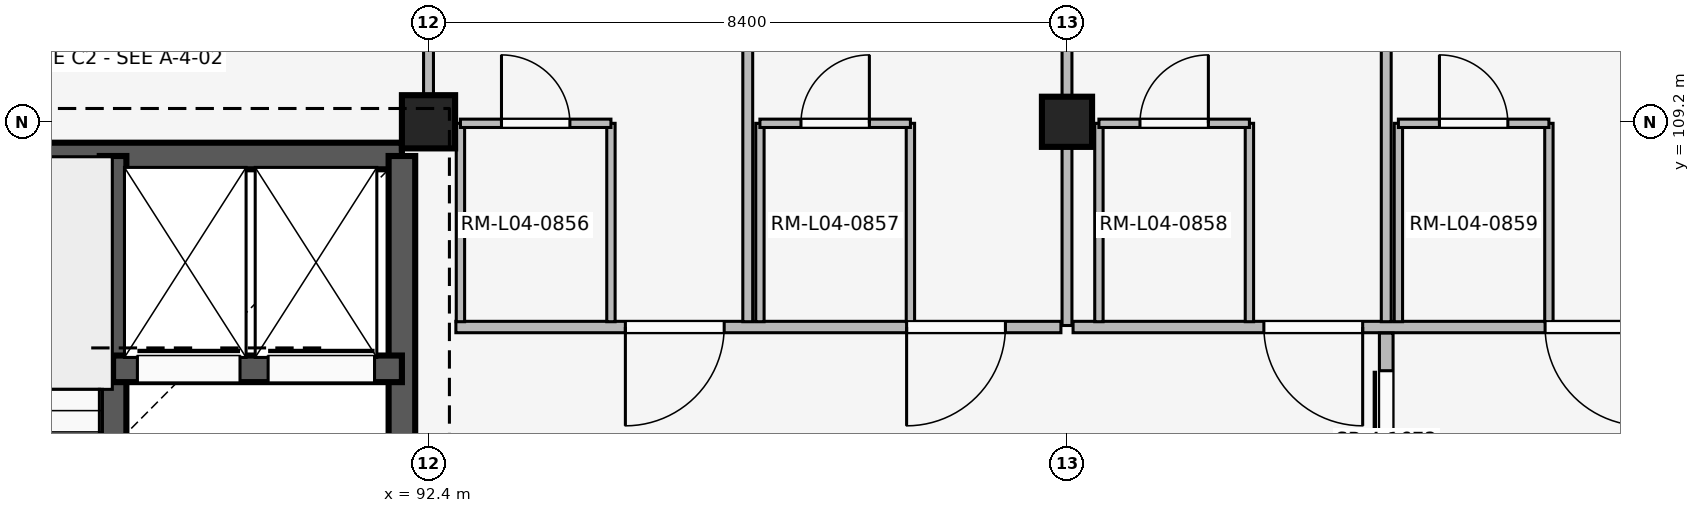
"""IFC4 building model, lengths in metres.
Left out: names, types, materials, properties, quantities, classifications, styles, units other than length and angle.
Written with IfcOpenShell. Run it as: python <this file> out.ifc"""

import sys

from ifc_helpers import new_model, si_unit, direction, frame, frame_2d, origin, origin_2d, place, context, subcontext, project, spatial, rectangle, extrude, element, fill, save


model = new_model("IFC4")
c1 = context("Model", 3, precision=1e-05, world=origin(), true_north=direction((0.0, 1.0)))
c2 = subcontext(c1, "Body", "Model", "MODEL_VIEW")
j1 = project(units=[si_unit("LENGTHUNIT", "METRE"), si_unit("PLANEANGLEUNIT", "RADIAN")], contexts=[c1])
p1 = place(None, origin())
s1 = spatial("IfcSite", under=j1, at=p1, CompositionType="ELEMENT")
p2 = place(p1, origin())
s2 = spatial("IfcBuilding", under=s1, at=p2, CompositionType="ELEMENT")
p3 = place(p2, frame((0.0, 0.0, 16.2)))
s3 = spatial("IfcBuildingStorey", under=s2, at=p3, CompositionType="ELEMENT", Elevation=16.2)
p4 = place(p3, frame((92.4, 109.2, 0.0), z_axis=(0.0, 0.0, 1.0), x_axis=(1.0, 0.0, 0.0)))
e1 = element("IfcColumn", 1, at=p4, inside=s3, PredefinedType="COLUMN", context=c2, shape_type="SweptSolid", body=[
    extrude(rectangle(XDim=0.7, YDim=0.7, at=origin_2d()), origin(), (0.0, 0.0, 1.0), 4.2),
])
p5 = place(p3, frame((100.8, 109.2, 0.0), z_axis=(0.0, 0.0, 1.0), x_axis=(1.0, 0.0, 0.0)))
e2 = element("IfcColumn", 2, at=p5, inside=s3, PredefinedType="COLUMN", context=c2, shape_type="SweptSolid", body=[
    extrude(rectangle(XDim=0.66, YDim=0.66, at=origin_2d()), origin(), (0.0, 0.0, 1.0), 4.2),
])
p6 = place(p3, frame((84.55, 108.75, 0.0), z_axis=(0.0, 0.0, 1.0), x_axis=(1.0, 0.0, 0.0)))
e3 = element("IfcWall", 3, at=p6, inside=s3, PredefinedType="SHEAR", context=c2, shape_type="SweptSolid", body=[
    extrude(rectangle(XDim=7.5, YDim=0.35, at=frame_2d((3.75, 0.0))), origin(), (0.0, 0.0, 1.0), 3.92),
])
p7 = place(p3, frame((92.05, 101.2, 0.0), z_axis=(0.0, 0.0, 1.0), x_axis=(0.0, 1.0, 0.0)))
e4 = element("IfcWall", 4, at=p7, inside=s3, PredefinedType="SHEAR", context=c2, shape_type="SweptSolid", body=[
    extrude(rectangle(XDim=7.55, YDim=0.35, at=frame_2d((3.775, 0.0))), origin(), (0.0, 0.0, 1.0), 3.92),
])
p8 = place(p7, frame((2.4, 0.0, 0.0)))
e5 = element("IfcOpeningElement", 5, at=p8, cuts=e4, PredefinedType="OPENING", context=c2, shape_type="SweptSolid", body=[
    extrude(rectangle(XDim=1.2, YDim=2.2, at=frame_2d((0.6, 1.1))), frame((0.0, 0.185, 0.0), z_axis=(0.0, -1.0, 0.0), x_axis=(1.0, 0.0, 0.0)), (0.0, 0.0, 1.0), 0.37),
])
p9 = place(p3, frame((88.25, 101.2, 0.0), z_axis=(0.0, 0.0, 1.0), x_axis=(0.0, 1.0, 0.0)))
e6 = element("IfcWall", 6, at=p9, inside=s3, PredefinedType="SHEAR", context=c2, shape_type="SweptSolid", body=[
    extrude(rectangle(XDim=7.55, YDim=0.35, at=frame_2d((3.775, 0.0))), origin(), (0.0, 0.0, 1.0), 3.92),
])
p10 = place(p9, frame((0.28, 0.0, 0.0)))
e7 = element("IfcOpeningElement", 7, at=p10, cuts=e6, PredefinedType="OPENING", context=c2, shape_type="SweptSolid", body=[
    extrude(rectangle(XDim=1.0, YDim=2.15, at=frame_2d((0.5, 1.075))), frame((0.0, 0.185, 0.0), z_axis=(0.0, -1.0, 0.0), x_axis=(1.0, 0.0, 0.0)), (0.0, 0.0, 1.0), 0.37),
])
p11 = place(p3, frame((88.25, 105.95, 0.0), z_axis=(0.0, 0.0, 1.0), x_axis=(1.0, 0.0, 0.0)))
e8 = element("IfcWall", 8, at=p11, inside=s3, PredefinedType="SHEAR", context=c2, shape_type="SweptSolid", body=[
    extrude(rectangle(XDim=3.8, YDim=0.35, at=frame_2d((1.9, 0.0))), origin(), (0.0, 0.0, 1.0), 3.92),
])
p12 = place(p11, frame((0.32, 0.0, 0.0)))
e9 = element("IfcOpeningElement", 9, at=p12, cuts=e8, PredefinedType="OPENING", context=c2, shape_type="SweptSolid", body=[
    extrude(rectangle(XDim=1.35, YDim=2.25, at=frame_2d((0.675, 1.125))), frame((0.0, 0.185, 0.0), z_axis=(0.0, -1.0, 0.0), x_axis=(1.0, 0.0, 0.0)), (0.0, 0.0, 1.0), 0.37),
])
p13 = place(p11, frame((2.04, 0.0, 0.0)))
e10 = element("IfcOpeningElement", 10, at=p13, cuts=e8, PredefinedType="OPENING", context=c2, shape_type="SweptSolid", body=[
    extrude(rectangle(XDim=1.4, YDim=2.25, at=frame_2d((0.7, 1.125))), frame((0.0, 0.185, 0.0), z_axis=(0.0, -1.0, 0.0), x_axis=(1.0, 0.0, 0.0)), (0.0, 0.0, 1.0), 0.37),
])
p14 = place(p3, frame((92.4, 109.55, 0.0), z_axis=(0.0, 0.0, 1.0), x_axis=(0.0, 1.0, 0.0)))
e11 = element("IfcWall", 11, at=p14, inside=s3, PredefinedType="PARTITIONING", context=c2, shape_type="SweptSolid", body=[
    extrude(rectangle(XDim=7.91, YDim=0.13, at=frame_2d((3.955, 0.0))), origin(), (0.0, 0.0, 1.0), 3.3),
])
p15 = place(p14, frame((3.4, 0.0, 0.0)))
e12 = element("IfcOpeningElement", 12, at=p15, cuts=e11, PredefinedType="OPENING", context=c2, shape_type="SweptSolid", body=[
    extrude(rectangle(XDim=1.05, YDim=2.2, at=frame_2d((0.525, 1.1))), frame((0.0, 0.075, 0.0), z_axis=(0.0, -1.0, 0.0), x_axis=(1.0, 0.0, 0.0)), (0.0, 0.0, 1.0), 0.15),
])
p16 = place(p3, frame((100.72, 106.5, 0.0), z_axis=(0.0, 0.0, 1.0), x_axis=(-1.0, 0.0, 0.0)))
e13 = element("IfcWall", 13, at=p16, inside=s3, PredefinedType="PARTITIONING", context=c2, shape_type="SweptSolid", body=[
    extrude(rectangle(XDim=7.96, YDim=0.15, at=frame_2d((3.98, 0.0))), origin(), (0.0, 0.0, 1.0), 3.3),
])
p17 = place(p16, frame((0.73, 0.0, 0.0)))
e14 = element("IfcOpeningElement", 14, at=p17, cuts=e13, PredefinedType="OPENING", context=c2, shape_type="SweptSolid", body=[
    extrude(rectangle(XDim=1.3, YDim=2.25, at=frame_2d((0.65, 1.125))), frame((0.0, 0.085, 0.0), z_axis=(0.0, -1.0, 0.0), x_axis=(1.0, 0.0, 0.0)), (0.0, 0.0, 1.0), 0.17),
])
p18 = place(p16, frame((4.43, 0.0, 0.0)))
e15 = element("IfcOpeningElement", 15, at=p18, cuts=e13, PredefinedType="OPENING", context=c2, shape_type="SweptSolid", body=[
    extrude(rectangle(XDim=1.3, YDim=2.25, at=frame_2d((0.65, 1.125))), frame((0.0, 0.085, 0.0), z_axis=(0.0, -1.0, 0.0), x_axis=(1.0, 0.0, 0.0)), (0.0, 0.0, 1.0), 0.17),
])
p19 = place(p3, frame((96.6, 106.57, 0.0), z_axis=(0.0, 0.0, 1.0), x_axis=(0.0, 1.0, 0.0)))
e16 = element("IfcWall", 16, at=p19, inside=s3, PredefinedType="PARTITIONING", context=c2, shape_type="SweptSolid", body=[
    extrude(rectangle(XDim=10.93, YDim=0.13, at=frame_2d((5.465, 0.0))), origin(), (0.0, 0.0, 1.0), 3.3),
])
for number, where, z_axis, x_axis in (
    (17, (92.82, 106.57, 0.0), (0.0, 0.0, 1.0), (0.0, 1.0, 0.0)),
    (18, (94.8, 106.57, 0.0), (0.0, 0.0, 1.0), (0.0, 1.0, 0.0)),
):
    element("IfcWall", number, at=place(p3, frame(where, z_axis=z_axis, x_axis=x_axis)), inside=s3, PredefinedType="PARTITIONING", context=c2, shape_type="SweptSolid", body=[
        extrude(rectangle(XDim=2.61, YDim=0.11, at=frame_2d((1.305, 0.0))), origin(), (0.0, 0.0, 1.0), 3.3),
    ])
p20 = place(p3, frame((92.82, 109.18, 0.0), z_axis=(0.0, 0.0, 1.0), x_axis=(1.0, 0.0, 0.0)))
e19 = element("IfcWall", 19, at=p20, inside=s3, PredefinedType="PARTITIONING", context=c2, shape_type="SweptSolid", body=[
    extrude(rectangle(XDim=1.98, YDim=0.11, at=frame_2d((0.99, 0.0))), origin(), (0.0, 0.0, 1.0), 3.3),
])
p21 = place(p20, frame((0.54, 0.0, 0.0)))
e20 = element("IfcOpeningElement", 20, at=p21, cuts=e19, PredefinedType="OPENING", context=c2, shape_type="SweptSolid", body=[
    extrude(rectangle(XDim=0.9, YDim=2.1, at=frame_2d((0.45, 1.05))), frame((0.0, 0.065, 0.0), z_axis=(0.0, -1.0, 0.0), x_axis=(1.0, 0.0, 0.0)), (0.0, 0.0, 1.0), 0.13),
])
for number, where, z_axis, x_axis in (
    (21, (96.76, 106.57, 0.0), (0.0, 0.0, 1.0), (0.0, 1.0, 0.0)),
    (22, (98.74, 106.57, 0.0), (0.0, 0.0, 1.0), (0.0, 1.0, 0.0)),
):
    element("IfcWall", number, at=place(p3, frame(where, z_axis=z_axis, x_axis=x_axis)), inside=s3, PredefinedType="PARTITIONING", context=c2, shape_type="SweptSolid", body=[
        extrude(rectangle(XDim=2.61, YDim=0.11, at=frame_2d((1.305, 0.0))), origin(), (0.0, 0.0, 1.0), 3.3),
    ])
p22 = place(p3, frame((96.76, 109.18, 0.0), z_axis=(0.0, 0.0, 1.0), x_axis=(1.0, 0.0, 0.0)))
e23 = element("IfcWall", 23, at=p22, inside=s3, PredefinedType="PARTITIONING", context=c2, shape_type="SweptSolid", body=[
    extrude(rectangle(XDim=1.98, YDim=0.11, at=frame_2d((0.99, 0.0))), origin(), (0.0, 0.0, 1.0), 3.3),
])
p23 = place(p22, frame((0.54, 0.0, 0.0)))
e24 = element("IfcOpeningElement", 24, at=p23, cuts=e23, PredefinedType="OPENING", context=c2, shape_type="SweptSolid", body=[
    extrude(rectangle(XDim=0.9, YDim=2.1, at=frame_2d((0.45, 1.05))), frame((0.0, 0.065, 0.0), z_axis=(0.0, -1.0, 0.0), x_axis=(1.0, 0.0, 0.0)), (0.0, 0.0, 1.0), 0.13),
])
p24 = place(p3, frame((100.8, 106.52, 0.0), z_axis=(0.0, 0.0, 1.0), x_axis=(0.0, 1.0, 0.0)))
e25 = element("IfcWall", 25, at=p24, inside=s3, PredefinedType="PARTITIONING", context=c2, shape_type="SweptSolid", body=[
    extrude(rectangle(XDim=10.94, YDim=0.13, at=frame_2d((5.47, 0.0))), origin(), (0.0, 0.0, 1.0), 3.3),
])
p25 = place(p3, frame((109.12, 106.5, 0.0), z_axis=(0.0, 0.0, 1.0), x_axis=(-1.0, 0.0, 0.0)))
e26 = element("IfcWall", 26, at=p25, inside=s3, PredefinedType="PARTITIONING", context=c2, shape_type="SweptSolid", body=[
    extrude(rectangle(XDim=8.24, YDim=0.15, at=frame_2d((4.12, 0.0))), origin(), (0.0, 0.0, 1.0), 3.3),
])
p26 = place(p25, frame((0.73, 0.0, 0.0)))
e27 = element("IfcOpeningElement", 27, at=p26, cuts=e26, PredefinedType="OPENING", context=c2, shape_type="SweptSolid", body=[
    extrude(rectangle(XDim=1.3, YDim=2.25, at=frame_2d((0.65, 1.125))), frame((0.0, 0.085, 0.0), z_axis=(0.0, -1.0, 0.0), x_axis=(1.0, 0.0, 0.0)), (0.0, 0.0, 1.0), 0.17),
])
p27 = place(p25, frame((4.43, 0.0, 0.0)))
e28 = element("IfcOpeningElement", 28, at=p27, cuts=e26, PredefinedType="OPENING", context=c2, shape_type="SweptSolid", body=[
    extrude(rectangle(XDim=1.3, YDim=2.25, at=frame_2d((0.65, 1.125))), frame((0.0, 0.085, 0.0), z_axis=(0.0, -1.0, 0.0), x_axis=(1.0, 0.0, 0.0)), (0.0, 0.0, 1.0), 0.17),
])
p28 = place(p3, frame((105.0, 106.57, 0.0), z_axis=(0.0, 0.0, 1.0), x_axis=(0.0, 1.0, 0.0)))
e29 = element("IfcWall", 29, at=p28, inside=s3, PredefinedType="PARTITIONING", context=c2, shape_type="SweptSolid", body=[
    extrude(rectangle(XDim=10.93, YDim=0.13, at=frame_2d((5.465, 0.0))), origin(), (0.0, 0.0, 1.0), 3.3),
])
for number, where, z_axis, x_axis in (
    (30, (101.22, 106.57, 0.0), (0.0, 0.0, 1.0), (0.0, 1.0, 0.0)),
    (31, (103.2, 106.57, 0.0), (0.0, 0.0, 1.0), (0.0, 1.0, 0.0)),
):
    element("IfcWall", number, at=place(p3, frame(where, z_axis=z_axis, x_axis=x_axis)), inside=s3, PredefinedType="PARTITIONING", context=c2, shape_type="SweptSolid", body=[
        extrude(rectangle(XDim=2.61, YDim=0.11, at=frame_2d((1.305, 0.0))), origin(), (0.0, 0.0, 1.0), 3.3),
    ])
p29 = place(p3, frame((101.22, 109.18, 0.0), z_axis=(0.0, 0.0, 1.0), x_axis=(1.0, 0.0, 0.0)))
e32 = element("IfcWall", 32, at=p29, inside=s3, PredefinedType="PARTITIONING", context=c2, shape_type="SweptSolid", body=[
    extrude(rectangle(XDim=1.98, YDim=0.11, at=frame_2d((0.99, 0.0))), origin(), (0.0, 0.0, 1.0), 3.3),
])
p30 = place(p29, frame((0.54, 0.0, 0.0)))
e33 = element("IfcOpeningElement", 33, at=p30, cuts=e32, PredefinedType="OPENING", context=c2, shape_type="SweptSolid", body=[
    extrude(rectangle(XDim=0.9, YDim=2.1, at=frame_2d((0.45, 1.05))), frame((0.0, 0.065, 0.0), z_axis=(0.0, -1.0, 0.0), x_axis=(1.0, 0.0, 0.0)), (0.0, 0.0, 1.0), 0.13),
])
for number, where, z_axis, x_axis in (
    (34, (105.16, 106.57, 0.0), (0.0, 0.0, 1.0), (0.0, 1.0, 0.0)),
    (35, (107.14, 106.57, 0.0), (0.0, 0.0, 1.0), (0.0, 1.0, 0.0)),
):
    element("IfcWall", number, at=place(p3, frame(where, z_axis=z_axis, x_axis=x_axis)), inside=s3, PredefinedType="PARTITIONING", context=c2, shape_type="SweptSolid", body=[
        extrude(rectangle(XDim=2.61, YDim=0.11, at=frame_2d((1.305, 0.0))), origin(), (0.0, 0.0, 1.0), 3.3),
    ])
p31 = place(p3, frame((105.16, 109.18, 0.0), z_axis=(0.0, 0.0, 1.0), x_axis=(1.0, 0.0, 0.0)))
e36 = element("IfcWall", 36, at=p31, inside=s3, PredefinedType="PARTITIONING", context=c2, shape_type="SweptSolid", body=[
    extrude(rectangle(XDim=1.98, YDim=0.11, at=frame_2d((0.99, 0.0))), origin(), (0.0, 0.0, 1.0), 3.3),
])
p32 = place(p31, frame((0.54, 0.0, 0.0)))
e37 = element("IfcOpeningElement", 37, at=p32, cuts=e36, PredefinedType="OPENING", context=c2, shape_type="SweptSolid", body=[
    extrude(rectangle(XDim=0.9, YDim=2.1, at=frame_2d((0.45, 1.05))), frame((0.0, 0.065, 0.0), z_axis=(0.0, -1.0, 0.0), x_axis=(1.0, 0.0, 0.0)), (0.0, 0.0, 1.0), 0.13),
])
p33 = place(p3, frame((105.0, 103.58, 0.0), z_axis=(0.0, 0.0, 1.0), x_axis=(0.0, 1.0, 0.0)))
e38 = element("IfcWall", 38, at=p33, inside=s3, PredefinedType="PARTITIONING", context=c2, shape_type="SweptSolid", body=[
    extrude(rectangle(XDim=2.84, YDim=0.18, at=frame_2d((1.42, 0.0))), origin(), (0.0, 0.0, 1.0), 3.3),
])
p34 = place(p33, frame((0.495, 0.0, 0.0)))
e39 = element("IfcOpeningElement", 39, at=p34, cuts=e38, PredefinedType="OPENING", context=c2, shape_type="SweptSolid", body=[
    extrude(rectangle(XDim=1.85, YDim=2.3, at=frame_2d((0.925, 1.15))), frame((0.0, 0.1, 0.0), z_axis=(0.0, -1.0, 0.0), x_axis=(1.0, 0.0, 0.0)), (0.0, 0.0, 1.0), 0.2),
])
p35 = place(p12, origin())
e40 = element("IfcDoor", 40, at=p35, inside=s3, OperationType="SLIDING_TO_LEFT", PredefinedType="DOOR", context=c2, shape_type="SweptSolid", body=[
    extrude(rectangle(XDim=1.35, YDim=2.25, at=frame_2d((0.675, 1.125))), frame((0.0, 0.025, 0.0), z_axis=(0.0, -1.0, 0.0), x_axis=(1.0, 0.0, 0.0)), (0.0, 0.0, 1.0), 0.05),
])
fill(e9, e40)
p36 = place(p13, origin())
e41 = element("IfcDoor", 41, at=p36, inside=s3, OperationType="SLIDING_TO_LEFT", PredefinedType="DOOR", context=c2, shape_type="SweptSolid", body=[
    extrude(rectangle(XDim=1.4, YDim=2.25, at=frame_2d((0.7, 1.125))), frame((0.0, 0.025, 0.0), z_axis=(0.0, -1.0, 0.0), x_axis=(1.0, 0.0, 0.0)), (0.0, 0.0, 1.0), 0.05),
])
fill(e10, e41)
p37 = place(p17, origin())
e42 = element("IfcDoor", 42, at=p37, inside=s3, OperationType="SINGLE_SWING_RIGHT", PredefinedType="DOOR", context=c2, shape_type="SweptSolid", body=[
    extrude(rectangle(XDim=1.3, YDim=2.25, at=frame_2d((0.65, 1.125))), frame((0.0, 0.025, 0.0), z_axis=(0.0, -1.0, 0.0), x_axis=(1.0, 0.0, 0.0)), (0.0, 0.0, 1.0), 0.05),
])
fill(e14, e42)
p38 = place(p18, origin())
e43 = element("IfcDoor", 43, at=p38, inside=s3, OperationType="SINGLE_SWING_RIGHT", PredefinedType="DOOR", context=c2, shape_type="SweptSolid", body=[
    extrude(rectangle(XDim=1.3, YDim=2.25, at=frame_2d((0.65, 1.125))), frame((0.0, 0.025, 0.0), z_axis=(0.0, -1.0, 0.0), x_axis=(1.0, 0.0, 0.0)), (0.0, 0.0, 1.0), 0.05),
])
fill(e15, e43)
p39 = place(p21, origin())
e44 = element("IfcDoor", 44, at=p39, inside=s3, OperationType="SINGLE_SWING_LEFT", PredefinedType="DOOR", context=c2, shape_type="SweptSolid", body=[
    extrude(rectangle(XDim=0.9, YDim=2.1, at=frame_2d((0.45, 1.05))), frame((0.0, 0.025, 0.0), z_axis=(0.0, -1.0, 0.0), x_axis=(1.0, 0.0, 0.0)), (0.0, 0.0, 1.0), 0.05),
])
fill(e20, e44)
p40 = place(p23, origin())
e45 = element("IfcDoor", 45, at=p40, inside=s3, OperationType="SINGLE_SWING_RIGHT", PredefinedType="DOOR", context=c2, shape_type="SweptSolid", body=[
    extrude(rectangle(XDim=0.9, YDim=2.1, at=frame_2d((0.45, 1.05))), frame((0.0, 0.025, 0.0), z_axis=(0.0, -1.0, 0.0), x_axis=(1.0, 0.0, 0.0)), (0.0, 0.0, 1.0), 0.05),
])
fill(e24, e45)
p41 = place(p26, origin())
e46 = element("IfcDoor", 46, at=p41, inside=s3, OperationType="SINGLE_SWING_LEFT", PredefinedType="DOOR", context=c2, shape_type="SweptSolid", body=[
    extrude(rectangle(XDim=1.3, YDim=2.25, at=frame_2d((0.65, 1.125))), frame((0.0, 0.025, 0.0), z_axis=(0.0, -1.0, 0.0), x_axis=(1.0, 0.0, 0.0)), (0.0, 0.0, 1.0), 0.05),
])
fill(e27, e46)
p42 = place(p27, origin())
e47 = element("IfcDoor", 47, at=p42, inside=s3, OperationType="SINGLE_SWING_LEFT", PredefinedType="DOOR", context=c2, shape_type="SweptSolid", body=[
    extrude(rectangle(XDim=1.3, YDim=2.25, at=frame_2d((0.65, 1.125))), frame((0.0, 0.025, 0.0), z_axis=(0.0, -1.0, 0.0), x_axis=(1.0, 0.0, 0.0)), (0.0, 0.0, 1.0), 0.05),
])
fill(e28, e47)
p43 = place(p30, origin())
e48 = element("IfcDoor", 48, at=p43, inside=s3, OperationType="SINGLE_SWING_RIGHT", PredefinedType="DOOR", context=c2, shape_type="SweptSolid", body=[
    extrude(rectangle(XDim=0.9, YDim=2.1, at=frame_2d((0.45, 1.05))), frame((0.0, 0.025, 0.0), z_axis=(0.0, -1.0, 0.0), x_axis=(1.0, 0.0, 0.0)), (0.0, 0.0, 1.0), 0.05),
])
fill(e33, e48)
p44 = place(p32, origin())
e49 = element("IfcDoor", 49, at=p44, inside=s3, OperationType="SINGLE_SWING_LEFT", PredefinedType="DOOR", context=c2, shape_type="SweptSolid", body=[
    extrude(rectangle(XDim=0.9, YDim=2.1, at=frame_2d((0.45, 1.05))), frame((0.0, 0.025, 0.0), z_axis=(0.0, -1.0, 0.0), x_axis=(1.0, 0.0, 0.0)), (0.0, 0.0, 1.0), 0.05),
])
fill(e37, e49)
p45 = place(p34, origin())
e50 = element("IfcDoor", 50, at=p45, inside=s3, OperationType="SLIDING_TO_LEFT", PredefinedType="DOOR", context=c2, shape_type="SweptSolid", body=[
    extrude(rectangle(XDim=1.85, YDim=2.3, at=frame_2d((0.925, 1.15))), frame((0.0, 0.025, 0.0), z_axis=(0.0, -1.0, 0.0), x_axis=(1.0, 0.0, 0.0)), (0.0, 0.0, 1.0), 0.05),
])
fill(e39, e50)
save(model, sys.argv[1])
